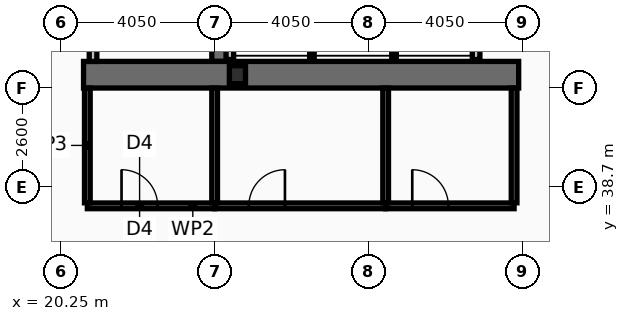
"""IFC4 building model, lengths in metres.
Left out: names, types, materials, properties, quantities, classifications, styles, units other than length and angle.
Written with IfcOpenShell. Run it as: python <this file> out.ifc"""

import sys

from ifc_helpers import new_model, si_unit, direction, frame, frame_2d, origin, origin_2d, place, context, subcontext, project, spatial, rectangle, i_section, extrude, element, fill, save


model = new_model("IFC4")
c1 = context("Model", 3, precision=1e-05, world=origin(), true_north=direction((0.0, 1.0)))
c2 = subcontext(c1, "Body", "Model", "MODEL_VIEW")
j1 = project(units=[si_unit("LENGTHUNIT", "METRE"), si_unit("PLANEANGLEUNIT", "RADIAN")], contexts=[c1])
p1 = place(None, origin())
s1 = spatial("IfcSite", under=j1, at=p1, CompositionType="ELEMENT")
p2 = place(p1, origin())
s2 = spatial("IfcBuilding", under=s1, at=p2, CompositionType="ELEMENT")
p3 = place(p2, frame((0.0, 0.0, 94.6)))
s3 = spatial("IfcBuildingStorey", under=s2, at=p3, CompositionType="ELEMENT", Elevation=94.6)
p4 = place(p3, frame((24.45, 42.0, 0.0), z_axis=(0.0, 0.0, 1.0), x_axis=(0.0, 1.0, 0.0)))
e1 = element("IfcWall", 1, at=p4, inside=s3, PredefinedType="SHEAR", context=c2, shape_type="SweptSolid", body=[
    extrude(rectangle(XDim=11.0, YDim=0.45, at=frame_2d((5.5, 0.0))), origin(), (0.0, 0.0, 1.0), 3.82),
])
p5 = place(p3, frame((32.3, 41.65, 0.0), z_axis=(0.0, 0.0, 1.0), x_axis=(-1.0, 0.0, 0.0)))
e2 = element("IfcWall", 2, at=p5, inside=s3, PredefinedType="SHEAR", context=c2, shape_type="SweptSolid", body=[
    extrude(rectangle(XDim=11.45, YDim=0.7, at=frame_2d((5.725, 0.0))), origin(), (0.0, 0.0, 1.0), 3.82),
])
p6 = place(p3, frame((24.9, 41.65, 0.0), z_axis=(0.0, 0.0, 1.0), x_axis=(1.0, 0.0, 0.0)))
e3 = element("IfcColumn", 3, at=p6, inside=s3, PredefinedType="COLUMN", context=c2, shape_type="SweptSolid", body=[
    extrude(i_section(OverallWidth=0.424, OverallDepth=0.474, WebThickness=0.048, FlangeThickness=0.077, at=origin_2d()), origin(), (0.0, 0.0, 1.0), 4.0),
])
p7 = place(p3, frame((21.1, 42.0, 0.0), z_axis=(0.0, 0.0, 1.0), x_axis=(0.0, 1.0, 0.0)))
e4 = element("IfcWall", 4, at=p7, inside=s3, PredefinedType="PARTITIONING", context=c2, shape_type="SweptSolid", body=[
    extrude(rectangle(XDim=2.495, YDim=0.2, at=frame_2d((1.248, 0.0))), origin(), (0.0, 0.0, 1.0), 3.82),
])
p8 = place(p7, frame((0.38, 0.0, 0.0)))
e5 = element("IfcOpeningElement", 5, at=p8, cuts=e4, PredefinedType="OPENING", context=c2, shape_type="SweptSolid", body=[
    extrude(rectangle(XDim=1.05, YDim=2.15, at=frame_2d((0.525, 1.075))), frame((0.0, 0.11, 0.0), z_axis=(0.0, -1.0, 0.0), x_axis=(1.0, 0.0, 0.0)), (0.0, 0.0, 1.0), 0.22),
])
for number, where, z_axis, x_axis in (
    (6, (24.7, 42.05, 0.0), (0.0, 0.0, 1.0), (0.0, 1.0, 0.0)),
    (7, (31.18, 42.05, 0.0), (0.0, 0.0, 1.0), (0.0, 1.0, 0.0)),
):
    element("IfcWall", number, at=place(p3, frame(where, z_axis=z_axis, x_axis=x_axis)), inside=s3, PredefinedType="PARTITIONING", context=c2, shape_type="SweptSolid", body=[
        extrude(rectangle(XDim=2.195, YDim=0.2, at=frame_2d((1.098, 0.0))), origin(), (0.0, 0.0, 1.0), 3.82),
    ])
for number, where, z_axis, x_axis in (
    (8, (26.86, 42.05, 0.0), (0.0, 0.0, 1.0), (0.0, 1.0, 0.0)),
    (9, (29.02, 42.05, 0.0), (0.0, 0.0, 1.0), (0.0, 1.0, 0.0)),
):
    element("IfcWall", number, at=place(p3, frame(where, z_axis=z_axis, x_axis=x_axis)), inside=s3, PredefinedType="PARTITIONING", context=c2, shape_type="SweptSolid", body=[
        extrude(rectangle(XDim=2.195, YDim=0.12, at=frame_2d((1.098, 0.0))), origin(), (0.0, 0.0, 1.0), 3.82),
    ])
p9 = place(p3, frame((20.95, 38.2, 0.0), z_axis=(0.0, 0.0, 1.0), x_axis=(1.0, 0.0, 0.0)))
e10 = element("IfcWall", 10, at=p9, inside=s3, PredefinedType="PARTITIONING", context=c2, shape_type="SweptSolid", body=[
    extrude(rectangle(XDim=3.35, YDim=0.15, at=frame_2d((1.675, 0.0))), origin(), (0.0, 0.0, 1.0), 3.82),
])
p10 = place(p9, frame((0.9, 0.0, 0.0)))
e11 = element("IfcOpeningElement", 11, at=p10, cuts=e10, PredefinedType="OPENING", context=c2, shape_type="SweptSolid", body=[
    extrude(rectangle(XDim=0.95, YDim=2.05, at=frame_2d((0.475, 1.025))), frame((0.0, 0.085, 0.0), z_axis=(0.0, -1.0, 0.0), x_axis=(1.0, 0.0, 0.0)), (0.0, 0.0, 1.0), 0.17),
])
p11 = place(p3, frame((24.3, 38.2, 0.0), z_axis=(0.0, 0.0, 1.0), x_axis=(1.0, 0.0, 0.0)))
e12 = element("IfcWall", 12, at=p11, inside=s3, PredefinedType="PARTITIONING", context=c2, shape_type="SweptSolid", body=[
    extrude(rectangle(XDim=4.5, YDim=0.15, at=frame_2d((2.25, 0.0))), origin(), (0.0, 0.0, 1.0), 3.01),
])
p12 = place(p11, frame((0.9, 0.0, 0.0)))
e13 = element("IfcOpeningElement", 13, at=p12, cuts=e12, PredefinedType="OPENING", context=c2, shape_type="SweptSolid", body=[
    extrude(rectangle(XDim=0.95, YDim=2.05, at=frame_2d((0.475, 1.025))), frame((0.0, 0.085, 0.0), z_axis=(0.0, -1.0, 0.0), x_axis=(1.0, 0.0, 0.0)), (0.0, 0.0, 1.0), 0.17),
])
p13 = place(p3, frame((28.8, 38.2, 0.0), z_axis=(0.0, 0.0, 1.0), x_axis=(1.0, 0.0, 0.0)))
e14 = element("IfcWall", 14, at=p13, inside=s3, PredefinedType="PARTITIONING", context=c2, shape_type="SweptSolid", body=[
    extrude(rectangle(XDim=3.38, YDim=0.15, at=frame_2d((1.69, 0.0))), origin(), (0.0, 0.0, 1.0), 3.01),
])
p14 = place(p13, frame((0.7, 0.0, 0.0)))
e15 = element("IfcOpeningElement", 15, at=p14, cuts=e14, PredefinedType="OPENING", context=c2, shape_type="SweptSolid", body=[
    extrude(rectangle(XDim=0.95, YDim=2.05, at=frame_2d((0.475, 1.025))), frame((0.0, 0.085, 0.0), z_axis=(0.0, -1.0, 0.0), x_axis=(1.0, 0.0, 0.0)), (0.0, 0.0, 1.0), 0.17),
])
for number, where, z_axis, x_axis in (
    (16, (20.95, 38.28, 0.0), (0.0, 0.0, 1.0), (0.0, 1.0, 0.0)),
    (17, (24.3, 38.28, 0.0), (0.0, 0.0, 1.0), (0.0, 1.0, 0.0)),
    (18, (28.8, 38.28, 0.0), (0.0, 0.0, 1.0), (0.0, 1.0, 0.0)),
    (19, (32.18, 38.28, 0.0), (0.0, 0.0, 1.0), (0.0, 1.0, 0.0)),
):
    element("IfcWall", number, at=place(p3, frame(where, z_axis=z_axis, x_axis=x_axis)), inside=s3, PredefinedType="PARTITIONING", context=c2, shape_type="SweptSolid", body=[
        extrude(rectangle(XDim=3.02, YDim=0.15, at=frame_2d((1.51, 0.0))), origin(), (0.0, 0.0, 1.0), 3.82),
    ])
p15 = place(p10, origin())
e20 = element("IfcDoor", 20, at=p15, inside=s3, OperationType="SINGLE_SWING_LEFT", PredefinedType="DOOR", context=c2, shape_type="SweptSolid", body=[
    extrude(rectangle(XDim=0.95, YDim=2.05, at=frame_2d((0.475, 1.025))), frame((0.0, 0.025, 0.0), z_axis=(0.0, -1.0, 0.0), x_axis=(1.0, 0.0, 0.0)), (0.0, 0.0, 1.0), 0.05),
])
fill(e11, e20)
p16 = place(p12, origin())
e21 = element("IfcDoor", 21, at=p16, inside=s3, OperationType="SINGLE_SWING_RIGHT", PredefinedType="DOOR", context=c2, shape_type="SweptSolid", body=[
    extrude(rectangle(XDim=0.95, YDim=2.05, at=frame_2d((0.475, 1.025))), frame((0.0, 0.025, 0.0), z_axis=(0.0, -1.0, 0.0), x_axis=(1.0, 0.0, 0.0)), (0.0, 0.0, 1.0), 0.05),
])
fill(e13, e21)
p17 = place(p14, origin())
e22 = element("IfcDoor", 22, at=p17, inside=s3, OperationType="SINGLE_SWING_LEFT", PredefinedType="DOOR", context=c2, shape_type="SweptSolid", body=[
    extrude(rectangle(XDim=0.95, YDim=2.05, at=frame_2d((0.475, 1.025))), frame((0.0, 0.025, 0.0), z_axis=(0.0, -1.0, 0.0), x_axis=(1.0, 0.0, 0.0)), (0.0, 0.0, 1.0), 0.05),
])
fill(e15, e22)
save(model, sys.argv[1])
